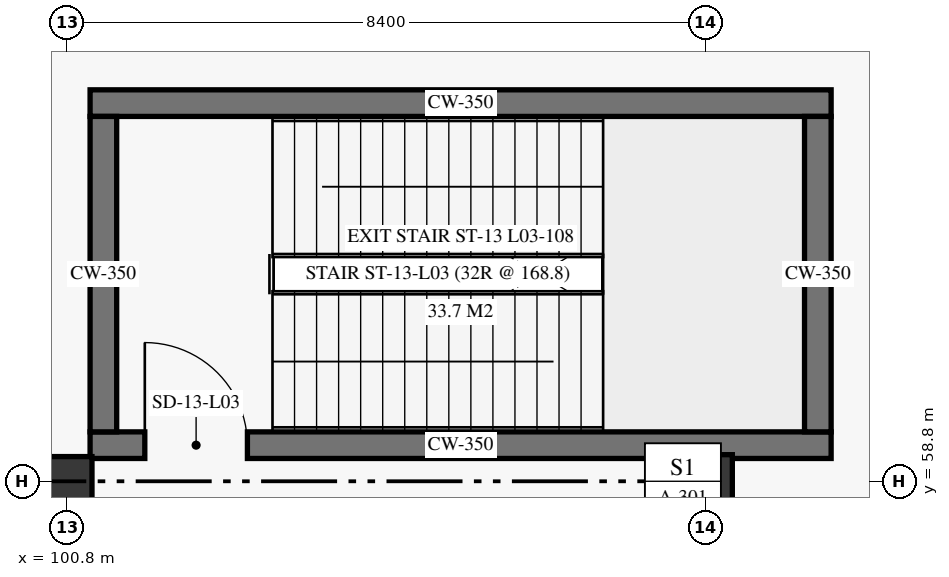
"""IFC4 building model, lengths in metres.
Left out: names, types, materials, properties, quantities, classifications, styles, units other than length and angle.
Written with IfcOpenShell. Run it as: python <this file> out.ifc"""

import sys

from ifc_helpers import new_model, si_unit, direction, frame, frame_2d, origin, origin_2d, place, context, subcontext, project, spatial, rectangle, extrude, element, fill, save


model = new_model("IFC4")
c1 = context("Model", 3, precision=1e-05, world=origin(), true_north=direction((0.0, 1.0)))
c2 = subcontext(c1, "Body", "Model", "MODEL_VIEW")
j1 = project(units=[si_unit("LENGTHUNIT", "METRE"), si_unit("PLANEANGLEUNIT", "RADIAN")], contexts=[c1])
p1 = place(None, origin())
s1 = spatial("IfcSite", under=j1, at=p1, CompositionType="ELEMENT")
p2 = place(p1, origin())
s2 = spatial("IfcBuilding", under=s1, at=p2, CompositionType="ELEMENT")
p3 = place(p2, frame((0.0, 0.0, 11.4)))
s3 = spatial("IfcBuildingStorey", under=s2, at=p3, CompositionType="ELEMENT", Elevation=11.4)
p4 = place(p3, frame((100.8, 58.8, 0.0), z_axis=(0.0, 0.0, 1.0), x_axis=(1.0, 0.0, 0.0)))
e1 = element("IfcColumn", 1, at=p4, inside=s3, PredefinedType="COLUMN", context=c2, shape_type="SweptSolid", body=[
    extrude(rectangle(XDim=0.65, YDim=0.65, at=origin_2d()), origin(), (0.0, 0.0, 1.0), 5.1),
])
p5 = place(p3, frame((109.2, 58.8, 0.0), z_axis=(0.0, 0.0, 1.0), x_axis=(1.0, 0.0, 0.0)))
e2 = element("IfcColumn", 2, at=p5, inside=s3, PredefinedType="COLUMN", context=c2, shape_type="SweptSolid", body=[
    extrude(rectangle(XDim=0.7, YDim=0.7, at=origin_2d()), origin(), (0.0, 0.0, 1.0), 5.1),
])
p6 = place(p3, frame((101.1, 59.275, 0.0), z_axis=(0.0, 0.0, 1.0), x_axis=(1.0, 0.0, 0.0)))
e3 = element("IfcWall", 3, at=p6, inside=s3, PredefinedType="SHEAR", context=c2, shape_type="SweptSolid", body=[
    extrude(rectangle(XDim=9.75, YDim=0.35, at=frame_2d((4.875, 0.0))), origin(), (0.0, 0.0, 1.0), 5.1),
])
p7 = place(p6, frame((0.72, 0.0, 0.0)))
e4 = element("IfcOpeningElement", 4, at=p7, cuts=e3, PredefinedType="OPENING", context=c2, shape_type="SweptSolid", body=[
    extrude(rectangle(XDim=1.35, YDim=2.25, at=frame_2d((0.675, 1.125))), frame((0.0, 0.185, 0.0), z_axis=(0.0, -1.0, 0.0), x_axis=(1.0, 0.0, 0.0)), (0.0, 0.0, 1.0), 0.37),
])
p8 = place(p3, frame((101.1, 63.775, 0.0), z_axis=(0.0, 0.0, 1.0), x_axis=(1.0, 0.0, 0.0)))
e5 = element("IfcWall", 5, at=p8, inside=s3, PredefinedType="SHEAR", context=c2, shape_type="SweptSolid", body=[
    extrude(rectangle(XDim=9.75, YDim=0.35, at=frame_2d((4.875, 0.0))), origin(), (0.0, 0.0, 1.0), 5.1),
])
for number, where, z_axis, x_axis in (
    (6, (101.275, 59.45, 0.0), (0.0, 0.0, 1.0), (0.0, 1.0, 0.0)),
    (7, (110.675, 59.45, 0.0), (0.0, 0.0, 1.0), (0.0, 1.0, 0.0)),
):
    element("IfcWall", number, at=place(p3, frame(where, z_axis=z_axis, x_axis=x_axis)), inside=s3, PredefinedType="SHEAR", context=c2, shape_type="SweptSolid", body=[
        extrude(rectangle(XDim=4.15, YDim=0.35, at=frame_2d((2.075, 0.0))), origin(), (0.0, 0.0, 1.0), 5.1),
    ])
p9 = place(p7, origin())
e8 = element("IfcDoor", 8, at=p9, inside=s3, OperationType="SINGLE_SWING_LEFT", PredefinedType="DOOR", context=c2, shape_type="SweptSolid", body=[
    extrude(rectangle(XDim=1.35, YDim=2.25, at=frame_2d((0.675, 1.125))), frame((0.0, 0.025, 0.0), z_axis=(0.0, -1.0, 0.0), x_axis=(1.0, 0.0, 0.0)), (0.0, 0.0, 1.0), 0.05),
])
fill(e4, e8)
save(model, sys.argv[1])
